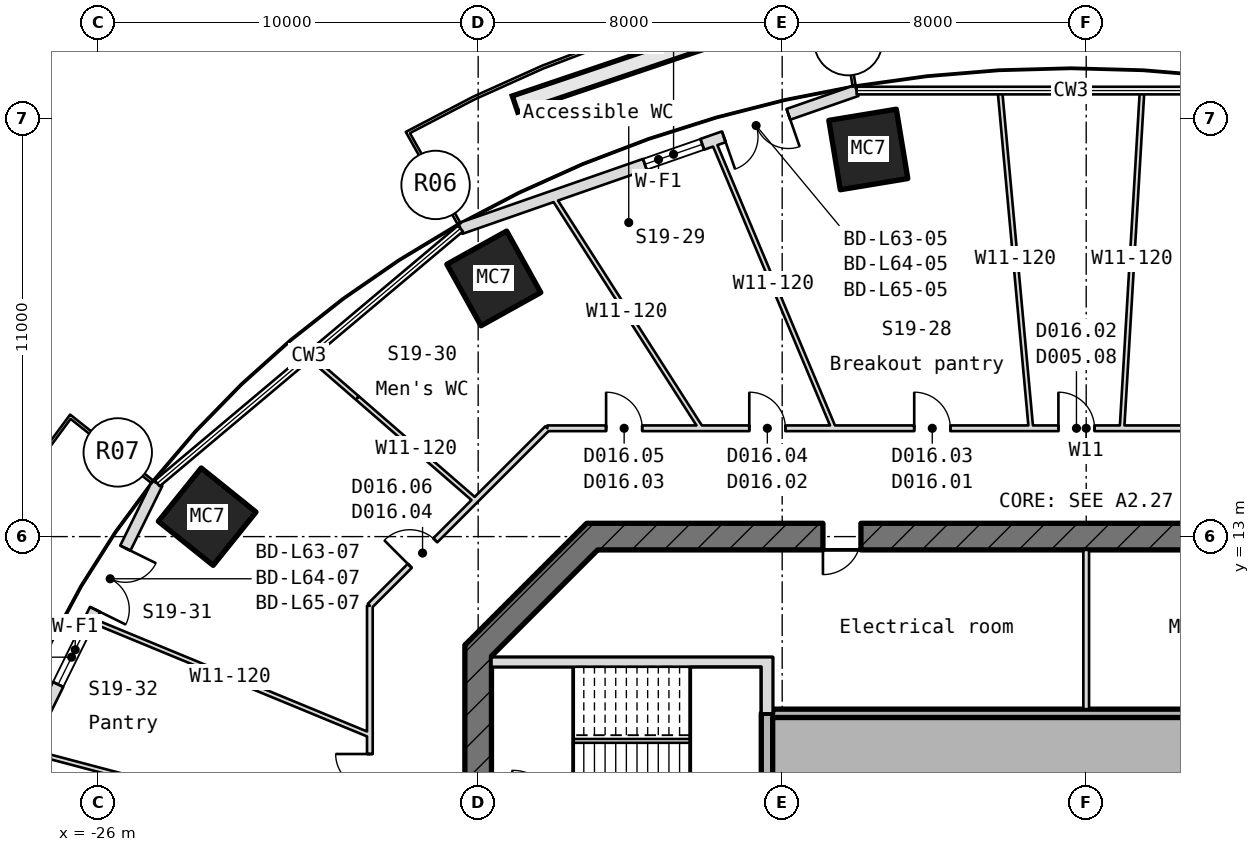
"""IFC4 building model, lengths in metres.
Left out: names, types, materials, properties, quantities, classifications, styles, units other than length and angle.
Written with IfcOpenShell. Run it as: python <this file> out.ifc"""

import sys

from ifc_helpers import new_model, si_unit, direction, frame, frame_2d, origin, origin_2d, place, context, subcontext, project, spatial, rectangle, hollow_rectangle, extrude, element, fill, save


model = new_model("IFC4")
c1 = context("Model", 3, precision=1e-05, world=origin(), true_north=direction((0.0, 1.0)))
c2 = subcontext(c1, "Body", "Model", "MODEL_VIEW")
j1 = project(units=[si_unit("LENGTHUNIT", "METRE"), si_unit("PLANEANGLEUNIT", "RADIAN")], contexts=[c1])
p1 = place(None, origin())
s1 = spatial("IfcSite", under=j1, at=p1, CompositionType="ELEMENT")
p2 = place(p1, origin())
s2 = spatial("IfcBuilding", under=s1, at=p2, CompositionType="ELEMENT")
p3 = place(p2, frame((0.0, 0.0, 284.5)))
s3 = spatial("IfcBuildingStorey", under=s2, at=p3, CompositionType="ELEMENT", Elevation=284.5)
for number, where, z_axis, x_axis in (
    (1, (-5.733, 23.186, -0.18), (0.0, 0.0, 1.0), (0.987, 0.163, 0.0)),
    (2, (-15.588, 19.793, -0.18), (0.0, 0.0, 1.0), (0.874, 0.486, 0.0)),
    (3, (-23.131, 13.524, -0.18), (0.0, 0.0, 1.0), (0.627, 0.779, 0.0)),
):
    element("IfcColumn", number, at=place(p3, frame(where, z_axis=z_axis, x_axis=x_axis)), inside=s3, PredefinedType="COLUMN", context=c2, shape_type="SweptSolid", body=[
        extrude(hollow_rectangle(XDim=1.8, YDim=1.85, WallThickness=0.06, at=origin_2d()), origin(), (0.0, 0.0, 1.0), 4.15),
    ])
p4 = place(p3, frame((-6.042, 24.736, 0.0), z_axis=(0.0, 0.0, 1.0), x_axis=(-0.944413217851, -0.328760815713, 0.0)))
e4 = element("IfcWall", 4, at=p4, inside=s3, PredefinedType="SOLIDWALL", context=c2, shape_type="SweptSolid", body=[
    extrude(rectangle(XDim=11.038, YDim=0.3, at=frame_2d((5.519, 0.0))), origin(), (0.0, 0.0, 1.0), 3.97),
])
p5 = place(p4, frame((1.9, 0.0, 0.0)))
e5 = element("IfcOpeningElement", 5, at=p5, cuts=e4, PredefinedType="OPENING", context=c2, shape_type="SweptSolid", body=[
    extrude(rectangle(XDim=1.8, YDim=2.4, at=frame_2d((0.9, 1.2))), frame((0.0, 0.16, 0.0), z_axis=(0.0, -1.0, 0.0), x_axis=(1.0, 0.0, 0.0)), (0.0, 0.0, 1.0), 0.32),
])
p6 = place(p4, frame((4.3, 0.0, 0.9)))
e6 = element("IfcOpeningElement", 6, at=p6, cuts=e4, PredefinedType="OPENING", context=c2, shape_type="SweptSolid", body=[
    extrude(rectangle(XDim=1.6, YDim=1.5, at=frame_2d((0.8, 0.75))), frame((0.0, 0.16, 0.0), z_axis=(0.0, -1.0, 0.0), x_axis=(1.0, 0.0, 0.0)), (0.0, 0.0, 1.0), 0.32),
])
p7 = place(p3, frame((-24.444, 14.402, 0.0), z_axis=(0.0, 0.0, 1.0), x_axis=(-0.442086999908, -0.896972175997, 0.0)))
e7 = element("IfcWall", 7, at=p7, inside=s3, PredefinedType="SOLIDWALL", context=c2, shape_type="SweptSolid", body=[
    extrude(rectangle(XDim=9.767, YDim=0.3, at=frame_2d((4.884, 0.0))), origin(), (0.0, 0.0, 1.0), 3.97),
])
p8 = place(p7, frame((1.9, 0.0, 0.0)))
e8 = element("IfcOpeningElement", 8, at=p8, cuts=e7, PredefinedType="OPENING", context=c2, shape_type="SweptSolid", body=[
    extrude(rectangle(XDim=1.8, YDim=2.4, at=frame_2d((0.9, 1.2))), frame((0.0, 0.16, 0.0), z_axis=(0.0, -1.0, 0.0), x_axis=(1.0, 0.0, 0.0)), (0.0, 0.0, 1.0), 0.32),
])
p9 = place(p7, frame((4.3, 0.0, 0.9)))
e9 = element("IfcOpeningElement", 9, at=p9, cuts=e7, PredefinedType="OPENING", context=c2, shape_type="SweptSolid", body=[
    extrude(rectangle(XDim=1.6, YDim=1.5, at=frame_2d((0.8, 0.75))), frame((0.0, 0.16, 0.0), z_axis=(0.0, -1.0, 0.0), x_axis=(1.0, 0.0, 0.0)), (0.0, 0.0, 1.0), 0.32),
])
p10 = place(p3, frame((13.145, 13.0, -0.18), z_axis=(0.0, 0.0, 1.0), x_axis=(-1.0, 0.0, 0.0)))
e10 = element("IfcWall", 10, at=p10, inside=s3, PredefinedType="SHEAR", context=c2, shape_type="SweptSolid", body=[
    extrude(rectangle(XDim=26.29, YDim=0.7, at=frame_2d((13.145, 0.0))), origin(), (0.0, 0.0, 1.0), 4.15),
])
p11 = place(p10, frame((19.073, 0.0, 0.18)))
e11 = element("IfcOpeningElement", 11, at=p11, cuts=e10, PredefinedType="OPENING", context=c2, shape_type="SweptSolid", body=[
    extrude(rectangle(XDim=1.0, YDim=2.1, at=frame_2d((0.5, 1.05))), frame((0.0, 0.36, 0.0), z_axis=(0.0, -1.0, 0.0), x_axis=(1.0, 0.0, 0.0)), (0.0, 0.0, 1.0), 0.72),
])
p12 = place(p10, frame((6.217, 0.0, 0.18)))
e12 = element("IfcOpeningElement", 12, at=p12, cuts=e10, PredefinedType="OPENING", context=c2, shape_type="SweptSolid", body=[
    extrude(rectangle(XDim=1.0, YDim=2.1, at=frame_2d((0.5, 1.05))), frame((0.0, 0.36, 0.0), z_axis=(0.0, -1.0, 0.0), x_axis=(1.0, 0.0, 0.0)), (0.0, 0.0, 1.0), 0.72),
])
p13 = place(p3, frame((-12.897, 13.103, -0.18), z_axis=(0.0, 0.0, 1.0), x_axis=(-0.707106781187, -0.707106781187, 0.0)))
e13 = element("IfcWall", 13, at=p13, inside=s3, PredefinedType="SHEAR", context=c2, shape_type="SweptSolid", body=[
    extrude(rectangle(XDim=4.533, YDim=0.7, at=frame_2d((2.266, 0.0))), origin(), (0.0, 0.0, 1.0), 4.15),
])
p14 = place(p3, frame((-16.0, 10.145, -0.18), z_axis=(0.0, 0.0, 1.0), x_axis=(0.0, -1.0, 0.0)))
e14 = element("IfcWall", 14, at=p14, inside=s3, PredefinedType="SHEAR", context=c2, shape_type="SweptSolid", body=[
    extrude(rectangle(XDim=20.29, YDim=0.7, at=frame_2d((10.145, 0.0))), origin(), (0.0, 0.0, 1.0), 4.15),
])
p15 = place(p14, frame((8.945, 0.0, 0.18)))
e15 = element("IfcOpeningElement", 15, at=p15, cuts=e14, PredefinedType="OPENING", context=c2, shape_type="SweptSolid", body=[
    extrude(rectangle(XDim=2.4, YDim=2.1, at=frame_2d((1.2, 1.05))), frame((0.0, 0.36, 0.0), z_axis=(0.0, -1.0, 0.0), x_axis=(1.0, 0.0, 0.0)), (0.0, 0.0, 1.0), 0.72),
])
p16 = place(p14, frame((5.545, 0.0, 0.18)))
e16 = element("IfcOpeningElement", 16, at=p16, cuts=e14, PredefinedType="OPENING", context=c2, shape_type="SweptSolid", body=[
    extrude(rectangle(XDim=1.2, YDim=2.1, at=frame_2d((0.6, 1.05))), frame((0.0, 0.36, 0.0), z_axis=(0.0, -1.0, 0.0), x_axis=(1.0, 0.0, 0.0)), (0.0, 0.0, 1.0), 0.72),
])
p17 = place(p3, frame((-8.25, 8.35, 0.0), z_axis=(0.0, 0.0, 1.0), x_axis=(1.0, 0.0, 0.0)))
e17 = element("IfcWall", 17, at=p17, inside=s3, PredefinedType="STANDARD", context=c2, shape_type="SweptSolid", body=[
    extrude(rectangle(XDim=16.5, YDim=0.22, at=frame_2d((8.25, 0.0))), origin(), (0.0, 0.0, 1.0), 3.97),
])
p18 = place(p3, frame((-15.65, 9.7, -0.18), z_axis=(0.0, 0.0, 1.0), x_axis=(1.0, 0.0, 0.0)))
e18 = element("IfcWall", 18, at=p18, inside=s3, PredefinedType="SHEAR", context=c2, shape_type="SweptSolid", body=[
    extrude(rectangle(XDim=7.1, YDim=0.25, at=frame_2d((3.55, 0.0))), origin(), (0.0, 0.0, 1.0), 4.15),
])
p19 = place(p3, frame((-8.4, 2.5, -0.18), z_axis=(0.0, 0.0, 1.0), x_axis=(0.0, 1.0, 0.0)))
e19 = element("IfcWall", 19, at=p19, inside=s3, PredefinedType="SHEAR", context=c2, shape_type="SweptSolid", body=[
    extrude(rectangle(XDim=5.85, YDim=0.3, at=frame_2d((2.925, 0.0))), origin(), (0.0, 0.0, 1.0), 4.15),
])
p20 = place(p3, frame((-8.4, 8.35, -0.18), z_axis=(0.0, 0.0, 1.0), x_axis=(0.0, 1.0, 0.0)))
e20 = element("IfcWall", 20, at=p20, inside=s3, PredefinedType="SHEAR", context=c2, shape_type="SweptSolid", body=[
    extrude(rectangle(XDim=1.475, YDim=0.3, at=frame_2d((0.737, 0.0))), origin(), (0.0, 0.0, 1.0), 4.15),
])
p21 = place(p3, frame((0.0, 8.46, 0.0), z_axis=(0.0, 0.0, 1.0), x_axis=(0.0, 1.0, 0.0)))
e21 = element("IfcWall", 21, at=p21, inside=s3, PredefinedType="PARTITIONING", context=c2, shape_type="SweptSolid", body=[
    extrude(rectangle(XDim=4.19, YDim=0.15, at=frame_2d((2.095, 0.0))), origin(), (0.0, 0.0, 1.0), 3.97),
])
p22 = place(p3, frame((-18.85, -11.18, 0.0), z_axis=(0.0, 0.0, 1.0), x_axis=(0.0, 1.0, 0.0)))
e22 = element("IfcWall", 22, at=p22, inside=s3, PredefinedType="PARTITIONING", context=c2, shape_type="SweptSolid", body=[
    extrude(rectangle(XDim=22.361, YDim=0.15, at=frame_2d((11.18, 0.0))), origin(), (0.0, 0.0, 1.0), 3.97),
])
p23 = place(p22, frame((16.66, 0.0, 0.0)))
e23 = element("IfcOpeningElement", 23, at=p23, cuts=e22, PredefinedType="OPENING", context=c2, shape_type="SweptSolid", body=[
    extrude(rectangle(XDim=1.8, YDim=2.1, at=frame_2d((0.9, 1.05))), frame((0.0, 0.085, 0.0), z_axis=(0.0, -1.0, 0.0), x_axis=(1.0, 0.0, 0.0)), (0.0, 0.0, 1.0), 0.17),
])
p24 = place(p22, frame((13.492, 0.0, 0.0)))
e24 = element("IfcOpeningElement", 24, at=p24, cuts=e22, PredefinedType="OPENING", context=c2, shape_type="SweptSolid", body=[
    extrude(rectangle(XDim=0.95, YDim=2.1, at=frame_2d((0.475, 1.05))), frame((0.0, 0.085, 0.0), z_axis=(0.0, -1.0, 0.0), x_axis=(1.0, 0.0, 0.0)), (0.0, 0.0, 1.0), 0.17),
])
p25 = place(p22, frame((6.952, 0.0, 0.0)))
e25 = element("IfcOpeningElement", 25, at=p25, cuts=e22, PredefinedType="OPENING", context=c2, shape_type="SweptSolid", body=[
    extrude(rectangle(XDim=0.95, YDim=2.1, at=frame_2d((0.475, 1.05))), frame((0.0, 0.085, 0.0), z_axis=(0.0, -1.0, 0.0), x_axis=(1.0, 0.0, 0.0)), (0.0, 0.0, 1.0), 0.17),
])
p26 = place(p3, frame((-18.85, 4.982, 0.0), z_axis=(0.0, 0.0, 1.0), x_axis=(-0.96680393986, 0.255519357134, 0.0)))
e26 = element("IfcWall", 26, at=p26, inside=s3, PredefinedType="PARTITIONING", context=c2, shape_type="SweptSolid", body=[
    extrude(rectangle(XDim=9.368, YDim=0.12, at=frame_2d((4.684, 0.0))), origin(), (0.0, 0.0, 1.0), 3.97),
])
p27 = place(p3, frame((-18.85, 7.777, 0.0), z_axis=(0.0, 0.0, 1.0), x_axis=(-0.924418879756, 0.381378728759, 0.0)))
e27 = element("IfcWall", 27, at=p27, inside=s3, PredefinedType="PARTITIONING", context=c2, shape_type="SweptSolid", body=[
    extrude(rectangle(XDim=7.965, YDim=0.12, at=frame_2d((3.982, 0.0))), origin(), (0.0, 0.0, 1.0), 3.97),
])
p28 = place(p3, frame((-18.85, 11.18, 0.0), z_axis=(0.0, 0.0, 1.0), x_axis=(0.707106781187, 0.707106781187, 0.0)))
e28 = element("IfcWall", 28, at=p28, inside=s3, PredefinedType="PARTITIONING", context=c2, shape_type="SweptSolid", body=[
    extrude(rectangle(XDim=6.604, YDim=0.15, at=frame_2d((3.302, 0.0))), origin(), (0.0, 0.0, 1.0), 3.97),
])
p29 = place(p28, frame((1.486, 0.0, 0.0)))
e29 = element("IfcOpeningElement", 29, at=p29, cuts=e28, PredefinedType="OPENING", context=c2, shape_type="SweptSolid", body=[
    extrude(rectangle(XDim=0.95, YDim=2.1, at=frame_2d((0.475, 1.05))), frame((0.0, 0.085, 0.0), z_axis=(0.0, -1.0, 0.0), x_axis=(1.0, 0.0, 0.0)), (0.0, 0.0, 1.0), 0.17),
])
p30 = place(p3, frame((-16.076, 13.954, 0.0), z_axis=(0.0, 0.0, 1.0), x_axis=(-0.755226494758, 0.655463913283, 0.0)))
e30 = element("IfcWall", 30, at=p30, inside=s3, PredefinedType="PARTITIONING", context=c2, shape_type="SweptSolid", body=[
    extrude(rectangle(XDim=4.111, YDim=0.12, at=frame_2d((2.056, 0.0))), origin(), (0.0, 0.0, 1.0), 3.66),
])
p31 = place(p3, frame((-19.181, 16.649, 0.0), z_axis=(0.0, 0.0, 1.0), x_axis=(-0.755144367742, 0.655558528178, 0.0)))
e31 = element("IfcWall", 31, at=p31, inside=s3, PredefinedType="PARTITIONING", context=c2, shape_type="SweptSolid", body=[
    extrude(rectangle(XDim=1.687, YDim=0.12, at=frame_2d((0.843, 0.0))), origin(), (0.0, 0.0, 1.0), 3.97),
])
p32 = place(p3, frame((-14.18, 15.85, 0.0), z_axis=(0.0, 0.0, 1.0), x_axis=(1.0, 0.0, 0.0)))
e32 = element("IfcWall", 32, at=p32, inside=s3, PredefinedType="PARTITIONING", context=c2, shape_type="SweptSolid", body=[
    extrude(rectangle(XDim=28.361, YDim=0.15, at=frame_2d((14.18, 0.0))), origin(), (0.0, 0.0, 1.0), 3.97),
])
p33 = place(p32, frame((21.267, 0.0, 0.0)))
e33 = element("IfcOpeningElement", 33, at=p33, cuts=e32, PredefinedType="OPENING", context=c2, shape_type="SweptSolid", body=[
    extrude(rectangle(XDim=0.95, YDim=2.1, at=frame_2d((0.475, 1.05))), frame((0.0, 0.085, 0.0), z_axis=(0.0, -1.0, 0.0), x_axis=(1.0, 0.0, 0.0)), (0.0, 0.0, 1.0), 0.17),
])
p34 = place(p32, frame((13.449, 0.0, 0.0)))
e34 = element("IfcOpeningElement", 34, at=p34, cuts=e32, PredefinedType="OPENING", context=c2, shape_type="SweptSolid", body=[
    extrude(rectangle(XDim=0.95, YDim=2.1, at=frame_2d((0.475, 1.05))), frame((0.0, 0.085, 0.0), z_axis=(0.0, -1.0, 0.0), x_axis=(1.0, 0.0, 0.0)), (0.0, 0.0, 1.0), 0.17),
])
p35 = place(p32, frame((9.655, 0.0, 0.0)))
e35 = element("IfcOpeningElement", 35, at=p35, cuts=e32, PredefinedType="OPENING", context=c2, shape_type="SweptSolid", body=[
    extrude(rectangle(XDim=0.95, YDim=2.1, at=frame_2d((0.475, 1.05))), frame((0.0, 0.085, 0.0), z_axis=(0.0, -1.0, 0.0), x_axis=(1.0, 0.0, 0.0)), (0.0, 0.0, 1.0), 0.17),
])
p36 = place(p32, frame((5.315, 0.0, 0.0)))
e36 = element("IfcOpeningElement", 36, at=p36, cuts=e32, PredefinedType="OPENING", context=c2, shape_type="SweptSolid", body=[
    extrude(rectangle(XDim=0.95, YDim=2.1, at=frame_2d((0.475, 1.05))), frame((0.0, 0.085, 0.0), z_axis=(0.0, -1.0, 0.0), x_axis=(1.0, 0.0, 0.0)), (0.0, 0.0, 1.0), 0.17),
])
p37 = place(p32, frame((1.547, 0.0, 0.0)))
e37 = element("IfcOpeningElement", 37, at=p37, cuts=e32, PredefinedType="OPENING", context=c2, shape_type="SweptSolid", body=[
    extrude(rectangle(XDim=0.95, YDim=2.1, at=frame_2d((0.475, 1.05))), frame((0.0, 0.085, 0.0), z_axis=(0.0, -1.0, 0.0), x_axis=(1.0, 0.0, 0.0)), (0.0, 0.0, 1.0), 0.17),
])
p38 = place(p3, frame((-10.137, 15.85, 0.0), z_axis=(0.0, 0.0, 1.0), x_axis=(-0.538802115327, 0.84243235961, 0.0)))
e38 = element("IfcWall", 38, at=p38, inside=s3, PredefinedType="PARTITIONING", context=c2, shape_type="SweptSolid", body=[
    extrude(rectangle(XDim=7.243, YDim=0.12, at=frame_2d((3.622, 0.0))), origin(), (0.0, 0.0, 1.0), 3.97),
])
p39 = place(p3, frame((-6.645, 15.85, 0.0), z_axis=(0.0, 0.0, 1.0), x_axis=(-0.386671197164, 0.92221764529, 0.0)))
e39 = element("IfcWall", 39, at=p39, inside=s3, PredefinedType="PARTITIONING", context=c2, shape_type="SweptSolid", body=[
    extrude(rectangle(XDim=8.209, YDim=0.12, at=frame_2d((4.104, 0.0))), origin(), (0.0, 0.0, 1.0), 3.97),
])
p40 = place(p3, frame((-1.455, 15.85, 0.0), z_axis=(0.0, 0.0, 1.0), x_axis=(-0.091408981172, 0.995813435419, 0.0)))
e40 = element("IfcWall", 40, at=p40, inside=s3, PredefinedType="PARTITIONING", context=c2, shape_type="SweptSolid", body=[
    extrude(rectangle(XDim=8.923, YDim=0.12, at=frame_2d((4.462, 0.0))), origin(), (0.0, 0.0, 1.0), 3.97),
])
p41 = place(p3, frame((0.942, 15.85, 0.0), z_axis=(0.0, 0.0, 1.0), x_axis=(0.059350641377, 0.998237196947, 0.0)))
e41 = element("IfcWall", 41, at=p41, inside=s3, PredefinedType="PARTITIONING", context=c2, shape_type="SweptSolid", body=[
    extrude(rectangle(XDim=8.902, YDim=0.12, at=frame_2d((4.451, 0.0))), origin(), (0.0, 0.0, 1.0), 3.97),
])
p42 = place(p5, origin())
e42 = element("IfcDoor", 42, at=p42, inside=s3, OperationType="SINGLE_SWING_LEFT", PredefinedType="DOOR", context=c2, shape_type="SweptSolid", body=[
    extrude(rectangle(XDim=1.8, YDim=2.4, at=frame_2d((0.9, 1.2))), frame((0.0, 0.025, 0.0), z_axis=(0.0, -1.0, 0.0), x_axis=(1.0, 0.0, 0.0)), (0.0, 0.0, 1.0), 0.05),
])
fill(e5, e42)
p43 = place(p6, origin())
e43 = element("IfcWindow", 43, at=p43, inside=s3, PartitioningType="SINGLE_PANEL", PredefinedType="WINDOW", context=c2, shape_type="SweptSolid", body=[
    extrude(rectangle(XDim=1.6, YDim=1.5, at=frame_2d((0.8, 0.75))), frame((0.0, 0.03, 0.0), z_axis=(0.0, -1.0, 0.0), x_axis=(1.0, 0.0, 0.0)), (0.0, 0.0, 1.0), 0.06),
])
fill(e6, e43)
p44 = place(p8, origin())
e44 = element("IfcDoor", 44, at=p44, inside=s3, OperationType="SINGLE_SWING_LEFT", PredefinedType="DOOR", context=c2, shape_type="SweptSolid", body=[
    extrude(rectangle(XDim=1.8, YDim=2.4, at=frame_2d((0.9, 1.2))), frame((0.0, 0.025, 0.0), z_axis=(0.0, -1.0, 0.0), x_axis=(1.0, 0.0, 0.0)), (0.0, 0.0, 1.0), 0.05),
])
fill(e8, e44)
p45 = place(p9, origin())
e45 = element("IfcWindow", 45, at=p45, inside=s3, PartitioningType="SINGLE_PANEL", PredefinedType="WINDOW", context=c2, shape_type="SweptSolid", body=[
    extrude(rectangle(XDim=1.6, YDim=1.5, at=frame_2d((0.8, 0.75))), frame((0.0, 0.03, 0.0), z_axis=(0.0, -1.0, 0.0), x_axis=(1.0, 0.0, 0.0)), (0.0, 0.0, 1.0), 0.06),
])
fill(e9, e45)
p46 = place(p11, origin())
e46 = element("IfcDoor", 46, at=p46, inside=s3, OperationType="SINGLE_SWING_RIGHT", PredefinedType="DOOR", context=c2, shape_type="SweptSolid", body=[
    extrude(rectangle(XDim=1.0, YDim=2.1, at=frame_2d((0.5, 1.05))), frame((0.0, 0.025, 0.0), z_axis=(0.0, -1.0, 0.0), x_axis=(1.0, 0.0, 0.0)), (0.0, 0.0, 1.0), 0.05),
])
fill(e11, e46)
p47 = place(p34, origin())
e47 = element("IfcDoor", 47, at=p47, inside=s3, OperationType="SINGLE_SWING_RIGHT", PredefinedType="DOOR", context=c2, shape_type="SweptSolid", body=[
    extrude(rectangle(XDim=0.95, YDim=2.1, at=frame_2d((0.475, 1.05))), frame((0.0, 0.025, 0.0), z_axis=(0.0, -1.0, 0.0), x_axis=(1.0, 0.0, 0.0)), (0.0, 0.0, 1.0), 0.05),
])
fill(e34, e47)
p48 = place(p35, origin())
e48 = element("IfcDoor", 48, at=p48, inside=s3, OperationType="SINGLE_SWING_RIGHT", PredefinedType="DOOR", context=c2, shape_type="SweptSolid", body=[
    extrude(rectangle(XDim=0.95, YDim=2.1, at=frame_2d((0.475, 1.05))), frame((0.0, 0.025, 0.0), z_axis=(0.0, -1.0, 0.0), x_axis=(1.0, 0.0, 0.0)), (0.0, 0.0, 1.0), 0.05),
])
fill(e35, e48)
p49 = place(p36, origin())
e49 = element("IfcDoor", 49, at=p49, inside=s3, OperationType="SINGLE_SWING_RIGHT", PredefinedType="DOOR", context=c2, shape_type="SweptSolid", body=[
    extrude(rectangle(XDim=0.95, YDim=2.1, at=frame_2d((0.475, 1.05))), frame((0.0, 0.025, 0.0), z_axis=(0.0, -1.0, 0.0), x_axis=(1.0, 0.0, 0.0)), (0.0, 0.0, 1.0), 0.05),
])
fill(e36, e49)
p50 = place(p37, origin())
e50 = element("IfcDoor", 50, at=p50, inside=s3, OperationType="SINGLE_SWING_RIGHT", PredefinedType="DOOR", context=c2, shape_type="SweptSolid", body=[
    extrude(rectangle(XDim=0.95, YDim=2.1, at=frame_2d((0.475, 1.05))), frame((0.0, 0.025, 0.0), z_axis=(0.0, -1.0, 0.0), x_axis=(1.0, 0.0, 0.0)), (0.0, 0.0, 1.0), 0.05),
])
fill(e37, e50)
p51 = place(p29, origin())
e51 = element("IfcDoor", 51, at=p51, inside=s3, OperationType="SINGLE_SWING_RIGHT", PredefinedType="DOOR", context=c2, shape_type="SweptSolid", body=[
    extrude(rectangle(XDim=0.95, YDim=2.1, at=frame_2d((0.475, 1.05))), frame((0.0, 0.025, 0.0), z_axis=(0.0, -1.0, 0.0), x_axis=(1.0, 0.0, 0.0)), (0.0, 0.0, 1.0), 0.05),
])
fill(e29, e51)
p52 = place(p23, origin())
e52 = element("IfcDoor", 52, at=p52, inside=s3, OperationType="DOUBLE_DOOR_SINGLE_SWING", PredefinedType="DOOR", context=c2, shape_type="SweptSolid", body=[
    extrude(rectangle(XDim=1.8, YDim=2.1, at=frame_2d((0.9, 1.05))), frame((0.0, 0.025, 0.0), z_axis=(0.0, -1.0, 0.0), x_axis=(1.0, 0.0, 0.0)), (0.0, 0.0, 1.0), 0.05),
])
fill(e23, e52)
save(model, sys.argv[1])
